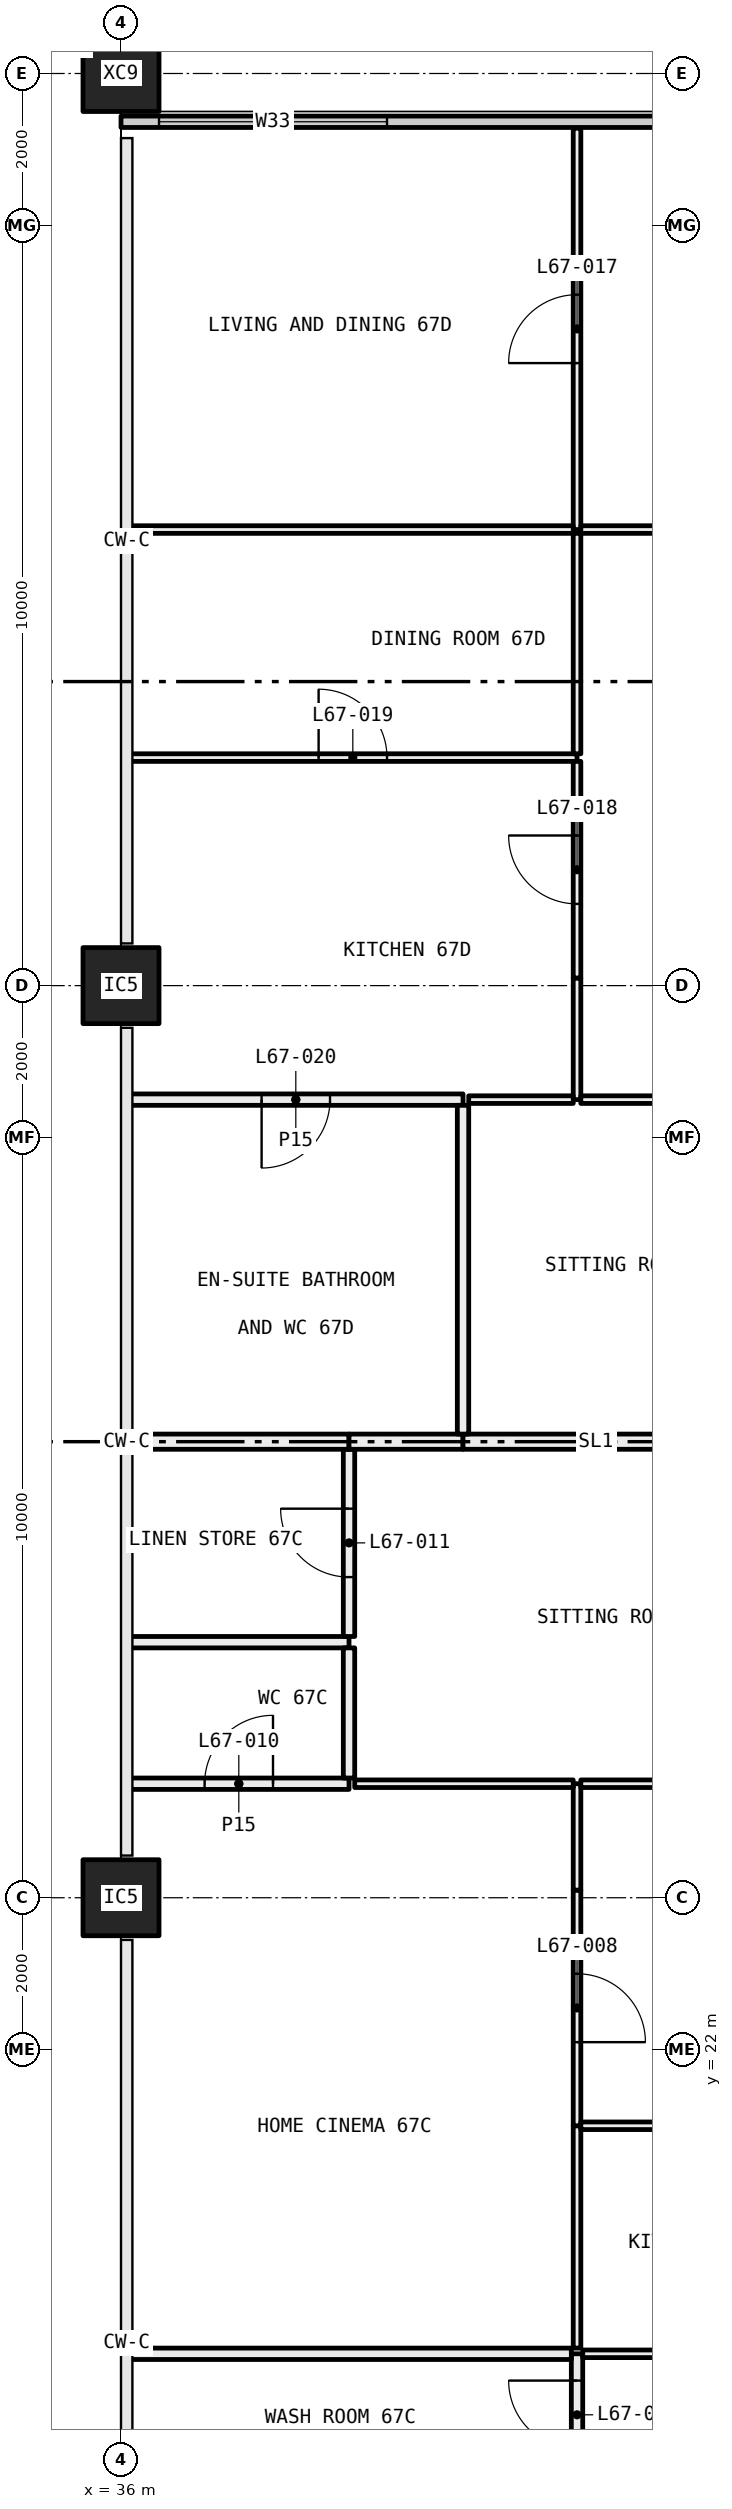
"""IFC4 building model, lengths in metres.
Left out: names, types, materials, properties, quantities, classifications, styles, units other than length and angle.
Written with IfcOpenShell. Run it as: python <this file> out.ifc"""

import sys

from ifc_helpers import new_model, si_unit, direction, frame, frame_2d, origin, origin_2d, place, context, subcontext, project, spatial, rectangle, hollow_rectangle, extrude, element, fill, save


model = new_model("IFC4")
c1 = context("Model", 3, precision=1e-05, world=origin(), true_north=direction((0.0, 1.0)))
c2 = subcontext(c1, "Body", "Model", "MODEL_VIEW")
j1 = project(units=[si_unit("LENGTHUNIT", "METRE"), si_unit("PLANEANGLEUNIT", "RADIAN")], contexts=[c1])
p1 = place(None, origin())
s1 = spatial("IfcSite", under=j1, at=p1, CompositionType="ELEMENT")
p2 = place(p1, origin())
s2 = spatial("IfcBuilding", under=s1, at=p2, CompositionType="ELEMENT")
p3 = place(p2, frame((0.0, 0.0, 249.0)))
s3 = spatial("IfcBuildingStorey", under=s2, at=p3, CompositionType="ELEMENT", Elevation=249.0)
for number, where, z_axis, x_axis in (
    (1, (36.0, 24.0, 0.0), (0.0, 0.0, 1.0), (1.0, 0.0, 0.0)),
    (2, (36.0, 36.0, 0.0), (0.0, 0.0, 1.0), (1.0, 0.0, 0.0)),
):
    element("IfcColumn", number, at=place(p3, frame(where, z_axis=z_axis, x_axis=x_axis)), inside=s3, PredefinedType="COLUMN", context=c2, shape_type="SweptSolid", body=[
        extrude(hollow_rectangle(XDim=1.0, YDim=1.0, WallThickness=0.04, at=origin_2d()), origin(), (0.0, 0.0, 1.0), 3.05),
    ])
p4 = place(p3, frame((36.0, 48.0, -0.4), z_axis=(0.0, 0.0, 1.0), x_axis=(1.0, 0.0, 0.0)))
e3 = element("IfcColumn", 3, at=p4, inside=s3, PredefinedType="COLUMN", context=c2, shape_type="SweptSolid", body=[
    extrude(hollow_rectangle(XDim=1.0, YDim=1.0, WallThickness=0.036, at=origin_2d()), origin(), (0.0, 0.0, 1.0), 3.45),
])
p5 = place(p3, frame((36.0, 47.365, 0.0), z_axis=(0.0, 0.0, 1.0), x_axis=(1.0, 0.0, 0.0)))
e4 = element("IfcWall", 4, at=p5, inside=s3, PredefinedType="ELEMENTEDWALL", context=c2, shape_type="SweptSolid", body=[
    extrude(rectangle(XDim=17.44, YDim=0.15, at=frame_2d((8.72, 0.0))), origin(), (0.0, 0.0, 1.0), 3.05),
])
p6 = place(p5, frame((0.5, 0.0, 0.45)))
e5 = element("IfcOpeningElement", 5, at=p6, cuts=e4, PredefinedType="OPENING", context=c2, shape_type="SweptSolid", body=[
    extrude(rectangle(XDim=3.0, YDim=2.55, at=frame_2d((1.5, 1.275))), frame((0.0, 0.085, 0.0), z_axis=(0.0, -1.0, 0.0), x_axis=(1.0, 0.0, 0.0)), (0.0, 0.0, 1.0), 0.17),
])
p7 = place(p5, frame((8.5, 0.0, 0.45)))
e6 = element("IfcOpeningElement", 6, at=p7, cuts=e4, PredefinedType="OPENING", context=c2, shape_type="SweptSolid", body=[
    extrude(rectangle(XDim=3.0, YDim=2.55, at=frame_2d((1.5, 1.275))), frame((0.0, 0.085, 0.0), z_axis=(0.0, -1.0, 0.0), x_axis=(1.0, 0.0, 0.0)), (0.0, 0.0, 1.0), 0.17),
])
p8 = place(p5, frame((12.5, 0.0, 0.45)))
e7 = element("IfcOpeningElement", 7, at=p8, cuts=e4, PredefinedType="OPENING", context=c2, shape_type="SweptSolid", body=[
    extrude(rectangle(XDim=4.5, YDim=2.55, at=frame_2d((2.25, 1.275))), frame((0.0, 0.085, 0.0), z_axis=(0.0, -1.0, 0.0), x_axis=(1.0, 0.0, 0.0)), (0.0, 0.0, 1.0), 0.17),
])
p9 = place(p3, frame((42.0, 16.395, 0.0), z_axis=(0.0, 0.0, 1.0), x_axis=(0.0, 1.0, 0.0)))
e8 = element("IfcWall", 8, at=p9, inside=s3, PredefinedType="PARTITIONING", context=c2, shape_type="SweptSolid", body=[
    extrude(rectangle(XDim=1.605, YDim=0.15, at=frame_2d((0.802, 0.0))), origin(), (0.0, 0.0, 1.0), 3.05),
])
p10 = place(p9, frame((0.353, 0.0, 0.0)))
e9 = element("IfcOpeningElement", 9, at=p10, cuts=e8, PredefinedType="OPENING", context=c2, shape_type="SweptSolid", body=[
    extrude(rectangle(XDim=0.9, YDim=2.1, at=frame_2d((0.45, 1.05))), frame((0.0, 0.085, 0.0), z_axis=(0.0, -1.0, 0.0), x_axis=(1.0, 0.0, 0.0)), (0.0, 0.0, 1.0), 0.17),
])
p11 = place(p3, frame((41.925, 18.0, 0.0), z_axis=(0.0, 0.0, 1.0), x_axis=(-1.0, 0.0, 0.0)))
e10 = element("IfcWall", 10, at=p11, inside=s3, PredefinedType="PARTITIONING", context=c2, shape_type="SweptSolid", body=[
    extrude(rectangle(XDim=5.825, YDim=0.15, at=frame_2d((2.913, 0.0))), origin(), (0.0, 0.0, 1.0), 3.05),
])
p12 = place(p3, frame((47.95, 18.0, 0.0), z_axis=(0.0, 0.0, 1.0), x_axis=(-1.0, 0.0, 0.0)))
e11 = element("IfcWall", 11, at=p12, inside=s3, PredefinedType="PARTITIONING", context=c2, shape_type="SweptSolid", body=[
    extrude(rectangle(XDim=5.875, YDim=0.1, at=frame_2d((2.938, 0.0))), origin(), (0.0, 0.0, 1.0), 3.05),
])
p13 = place(p12, frame((2.488, 0.0, 0.0)))
e12 = element("IfcOpeningElement", 12, at=p13, cuts=e11, PredefinedType="OPENING", context=c2, shape_type="SweptSolid", body=[
    extrude(rectangle(XDim=0.9, YDim=2.1, at=frame_2d((0.45, 1.05))), frame((0.0, 0.06, 0.0), z_axis=(0.0, -1.0, 0.0), x_axis=(1.0, 0.0, 0.0)), (0.0, 0.0, 1.0), 0.12),
])
p14 = place(p3, frame((42.0, 18.075, 0.0), z_axis=(0.0, 0.0, 1.0), x_axis=(0.0, 1.0, 0.0)))
e13 = element("IfcWall", 13, at=p14, inside=s3, PredefinedType="PARTITIONING", context=c2, shape_type="SweptSolid", body=[
    extrude(rectangle(XDim=2.925, YDim=0.1, at=frame_2d((1.462, 0.0))), origin(), (0.0, 0.0, 1.0), 3.05),
])
p15 = place(p3, frame((42.0, 21.0, 0.0), z_axis=(0.0, 0.0, 1.0), x_axis=(0.0, 1.0, 0.0)))
e14 = element("IfcWall", 14, at=p15, inside=s3, PredefinedType="PARTITIONING", context=c2, shape_type="SweptSolid", body=[
    extrude(rectangle(XDim=3.1, YDim=0.1, at=frame_2d((1.55, 0.0))), origin(), (0.0, 0.0, 1.0), 2.45),
])
p16 = place(p15, frame((1.1, 0.0, 0.0)))
e15 = element("IfcOpeningElement", 15, at=p16, cuts=e14, PredefinedType="OPENING", context=c2, shape_type="SweptSolid", body=[
    extrude(rectangle(XDim=0.9, YDim=2.1, at=frame_2d((0.45, 1.05))), frame((0.0, 0.06, 0.0), z_axis=(0.0, -1.0, 0.0), x_axis=(1.0, 0.0, 0.0)), (0.0, 0.0, 1.0), 0.12),
])
p17 = place(p3, frame((42.0, 24.1, 0.0), z_axis=(0.0, 0.0, 1.0), x_axis=(0.0, 1.0, 0.0)))
e16 = element("IfcWall", 16, at=p17, inside=s3, PredefinedType="PARTITIONING", context=c2, shape_type="SweptSolid", body=[
    extrude(rectangle(XDim=1.4, YDim=0.1, at=frame_2d((0.7, 0.0))), origin(), (0.0, 0.0, 1.0), 3.05),
])
p18 = place(p3, frame((39.0, 25.5, 0.0), z_axis=(0.0, 0.0, 1.0), x_axis=(-1.0, 0.0, 0.0)))
e17 = element("IfcWall", 17, at=p18, inside=s3, PredefinedType="PARTITIONING", context=c2, shape_type="SweptSolid", body=[
    extrude(rectangle(XDim=2.9, YDim=0.15, at=frame_2d((1.45, 0.0))), origin(), (0.0, 0.0, 1.0), 3.05),
])
p19 = place(p18, frame((1.0, 0.0, 0.0)))
e18 = element("IfcOpeningElement", 18, at=p19, cuts=e17, PredefinedType="OPENING", context=c2, shape_type="SweptSolid", body=[
    extrude(rectangle(XDim=0.9, YDim=2.1, at=frame_2d((0.45, 1.05))), frame((0.0, 0.085, 0.0), z_axis=(0.0, -1.0, 0.0), x_axis=(1.0, 0.0, 0.0)), (0.0, 0.0, 1.0), 0.17),
])
p20 = place(p3, frame((41.95, 25.5, 0.0), z_axis=(0.0, 0.0, 1.0), x_axis=(-1.0, 0.0, 0.0)))
e19 = element("IfcWall", 19, at=p20, inside=s3, PredefinedType="PARTITIONING", context=c2, shape_type="SweptSolid", body=[
    extrude(rectangle(XDim=2.875, YDim=0.1, at=frame_2d((1.438, 0.0))), origin(), (0.0, 0.0, 1.0), 3.05),
])
p21 = place(p3, frame((48.45, 21.0, 0.0), z_axis=(0.0, 0.0, 1.0), x_axis=(-1.0, 0.0, 0.0)))
e20 = element("IfcWall", 20, at=p21, inside=s3, PredefinedType="PARTITIONING", context=c2, shape_type="SweptSolid", body=[
    extrude(rectangle(XDim=6.4, YDim=0.1, at=frame_2d((3.2, 0.0))), origin(), (0.0, 0.0, 1.0), 3.05),
])
p22 = place(p21, frame((2.75, 0.0, 0.0)))
e21 = element("IfcOpeningElement", 21, at=p22, cuts=e20, PredefinedType="OPENING", context=c2, shape_type="SweptSolid", body=[
    extrude(rectangle(XDim=0.9, YDim=2.1, at=frame_2d((0.45, 1.05))), frame((0.0, 0.06, 0.0), z_axis=(0.0, -1.0, 0.0), x_axis=(1.0, 0.0, 0.0)), (0.0, 0.0, 1.0), 0.12),
])
p23 = place(p3, frame((48.5, 25.5, 0.0), z_axis=(0.0, 0.0, 1.0), x_axis=(-1.0, 0.0, 0.0)))
e22 = element("IfcWall", 22, at=p23, inside=s3, PredefinedType="PARTITIONING", context=c2, shape_type="SweptSolid", body=[
    extrude(rectangle(XDim=6.45, YDim=0.1, at=frame_2d((3.225, 0.0))), origin(), (0.0, 0.0, 1.0), 3.05),
])
p24 = place(p23, frame((2.775, 0.0, 0.0)))
e23 = element("IfcOpeningElement", 23, at=p24, cuts=e22, PredefinedType="OPENING", context=c2, shape_type="SweptSolid", body=[
    extrude(rectangle(XDim=0.9, YDim=2.1, at=frame_2d((0.45, 1.05))), frame((0.0, 0.06, 0.0), z_axis=(0.0, -1.0, 0.0), x_axis=(1.0, 0.0, 0.0)), (0.0, 0.0, 1.0), 0.12),
])
p25 = place(p3, frame((39.0, 27.362, 0.0), z_axis=(0.0, 0.0, 1.0), x_axis=(-1.0, 0.0, 0.0)))
e24 = element("IfcWall", 24, at=p25, inside=s3, PredefinedType="PARTITIONING", context=c2, shape_type="SweptSolid", body=[
    extrude(rectangle(XDim=2.9, YDim=0.15, at=frame_2d((1.45, 0.0))), origin(), (0.0, 0.0, 1.0), 3.05),
])
p26 = place(p3, frame((39.0, 25.575, 0.0), z_axis=(0.0, 0.0, 1.0), x_axis=(0.0, 1.0, 0.0)))
e25 = element("IfcWall", 25, at=p26, inside=s3, PredefinedType="PARTITIONING", context=c2, shape_type="SweptSolid", body=[
    extrude(rectangle(XDim=1.712, YDim=0.15, at=frame_2d((0.856, 0.0))), origin(), (0.0, 0.0, 1.0), 3.05),
])
p27 = place(p3, frame((39.0, 27.437, 0.0), z_axis=(0.0, 0.0, 1.0), x_axis=(0.0, 1.0, 0.0)))
e26 = element("IfcWall", 26, at=p27, inside=s3, PredefinedType="PARTITIONING", context=c2, shape_type="SweptSolid", body=[
    extrude(rectangle(XDim=2.463, YDim=0.15, at=frame_2d((1.231, 0.0))), origin(), (0.0, 0.0, 1.0), 3.05),
])
p28 = place(p27, frame((0.781, 0.0, 0.0)))
e27 = element("IfcOpeningElement", 27, at=p28, cuts=e26, PredefinedType="OPENING", context=c2, shape_type="SweptSolid", body=[
    extrude(rectangle(XDim=0.9, YDim=2.1, at=frame_2d((0.45, 1.05))), frame((0.0, 0.085, 0.0), z_axis=(0.0, -1.0, 0.0), x_axis=(1.0, 0.0, 0.0)), (0.0, 0.0, 1.0), 0.17),
])
p29 = place(p3, frame((39.0, 30.0, 0.0), z_axis=(0.0, 0.0, 1.0), x_axis=(-1.0, 0.0, 0.0)))
e28 = element("IfcWall", 28, at=p29, inside=s3, PredefinedType="PARTITIONING", context=c2, shape_type="SweptSolid", body=[
    extrude(rectangle(XDim=2.9, YDim=0.2, at=frame_2d((1.45, 0.0))), origin(), (0.0, 0.0, 1.0), 3.05),
])
p30 = place(p3, frame((40.5, 30.0, 0.0), z_axis=(0.0, 0.0, 1.0), x_axis=(-1.0, 0.0, 0.0)))
e29 = element("IfcWall", 29, at=p30, inside=s3, PredefinedType="PARTITIONING", context=c2, shape_type="SweptSolid", body=[
    extrude(rectangle(XDim=1.5, YDim=0.2, at=frame_2d((0.75, 0.0))), origin(), (0.0, 0.0, 1.0), 3.05),
])
p31 = place(p3, frame((46.1, 30.0, 0.0), z_axis=(0.0, 0.0, 1.0), x_axis=(-1.0, 0.0, 0.0)))
e30 = element("IfcWall", 30, at=p31, inside=s3, PredefinedType="PARTITIONING", context=c2, shape_type="SweptSolid", body=[
    extrude(rectangle(XDim=5.6, YDim=0.2, at=frame_2d((2.8, 0.0))), origin(), (0.0, 0.0, 1.0), 3.05),
])
p32 = place(p3, frame((42.0, 42.0, 0.0), z_axis=(0.0, 0.0, 1.0), x_axis=(0.0, 1.0, 0.0)))
e31 = element("IfcWall", 31, at=p32, inside=s3, PredefinedType="PARTITIONING", context=c2, shape_type="SweptSolid", body=[
    extrude(rectangle(XDim=5.28, YDim=0.1, at=frame_2d((2.64, 0.0))), origin(), (0.0, 0.0, 1.0), 3.05),
])
p33 = place(p32, frame((2.19, 0.0, 0.0)))
e32 = element("IfcOpeningElement", 32, at=p33, cuts=e31, PredefinedType="OPENING", context=c2, shape_type="SweptSolid", body=[
    extrude(rectangle(XDim=0.9, YDim=2.1, at=frame_2d((0.45, 1.05))), frame((0.0, 0.06, 0.0), z_axis=(0.0, -1.0, 0.0), x_axis=(1.0, 0.0, 0.0)), (0.0, 0.0, 1.0), 0.12),
])
p34 = place(p3, frame((36.1, 42.0, 0.0), z_axis=(0.0, 0.0, 1.0), x_axis=(1.0, 0.0, 0.0)))
e33 = element("IfcWall", 33, at=p34, inside=s3, PredefinedType="PARTITIONING", context=c2, shape_type="SweptSolid", body=[
    extrude(rectangle(XDim=5.85, YDim=0.1, at=frame_2d((2.925, 0.0))), origin(), (0.0, 0.0, 1.0), 3.05),
])
p35 = place(p3, frame((42.05, 42.0, 0.0), z_axis=(0.0, 0.0, 1.0), x_axis=(1.0, 0.0, 0.0)))
e34 = element("IfcWall", 34, at=p35, inside=s3, PredefinedType="PARTITIONING", context=c2, shape_type="SweptSolid", body=[
    extrude(rectangle(XDim=3.95, YDim=0.1, at=frame_2d((1.975, 0.0))), origin(), (0.0, 0.0, 1.0), 3.05),
])
p36 = place(p35, frame((1.525, 0.0, 0.0)))
e35 = element("IfcOpeningElement", 35, at=p36, cuts=e34, PredefinedType="OPENING", context=c2, shape_type="SweptSolid", body=[
    extrude(rectangle(XDim=0.9, YDim=2.1, at=frame_2d((0.45, 1.05))), frame((0.0, 0.06, 0.0), z_axis=(0.0, -1.0, 0.0), x_axis=(1.0, 0.0, 0.0)), (0.0, 0.0, 1.0), 0.12),
])
p37 = place(p3, frame((42.0, 39.0, 0.0), z_axis=(0.0, 0.0, 1.0), x_axis=(-1.0, 0.0, 0.0)))
e36 = element("IfcWall", 36, at=p37, inside=s3, PredefinedType="PARTITIONING", context=c2, shape_type="SweptSolid", body=[
    extrude(rectangle(XDim=5.9, YDim=0.1, at=frame_2d((2.95, 0.0))), origin(), (0.0, 0.0, 1.0), 3.05),
])
p38 = place(p37, frame((2.5, 0.0, 0.0)))
e37 = element("IfcOpeningElement", 37, at=p38, cuts=e36, PredefinedType="OPENING", context=c2, shape_type="SweptSolid", body=[
    extrude(rectangle(XDim=0.9, YDim=2.1, at=frame_2d((0.45, 1.05))), frame((0.0, 0.06, 0.0), z_axis=(0.0, -1.0, 0.0), x_axis=(1.0, 0.0, 0.0)), (0.0, 0.0, 1.0), 0.12),
])
p39 = place(p3, frame((42.0, 34.5, 0.0), z_axis=(0.0, 0.0, 1.0), x_axis=(0.0, 1.0, 0.0)))
e38 = element("IfcWall", 38, at=p39, inside=s3, PredefinedType="PARTITIONING", context=c2, shape_type="SweptSolid", body=[
    extrude(rectangle(XDim=1.6, YDim=0.1, at=frame_2d((0.8, 0.0))), origin(), (0.0, 0.0, 1.0), 2.45),
])
p40 = place(p3, frame((42.0, 36.1, 0.0), z_axis=(0.0, 0.0, 1.0), x_axis=(0.0, 1.0, 0.0)))
e39 = element("IfcWall", 39, at=p40, inside=s3, PredefinedType="PARTITIONING", context=c2, shape_type="SweptSolid", body=[
    extrude(rectangle(XDim=2.85, YDim=0.1, at=frame_2d((1.425, 0.0))), origin(), (0.0, 0.0, 1.0), 3.05),
])
p41 = place(p40, frame((0.975, 0.0, 0.0)))
e40 = element("IfcOpeningElement", 40, at=p41, cuts=e39, PredefinedType="OPENING", context=c2, shape_type="SweptSolid", body=[
    extrude(rectangle(XDim=0.9, YDim=2.1, at=frame_2d((0.45, 1.05))), frame((0.0, 0.06, 0.0), z_axis=(0.0, -1.0, 0.0), x_axis=(1.0, 0.0, 0.0)), (0.0, 0.0, 1.0), 0.12),
])
p42 = place(p3, frame((36.1, 34.5, 0.0), z_axis=(0.0, 0.0, 1.0), x_axis=(1.0, 0.0, 0.0)))
e41 = element("IfcWall", 41, at=p42, inside=s3, PredefinedType="PARTITIONING", context=c2, shape_type="SweptSolid", body=[
    extrude(rectangle(XDim=4.4, YDim=0.15, at=frame_2d((2.2, 0.0))), origin(), (0.0, 0.0, 1.0), 3.05),
])
p43 = place(p42, frame((1.75, 0.0, 0.0)))
e42 = element("IfcOpeningElement", 42, at=p43, cuts=e41, PredefinedType="OPENING", context=c2, shape_type="SweptSolid", body=[
    extrude(rectangle(XDim=0.9, YDim=2.1, at=frame_2d((0.45, 1.05))), frame((0.0, 0.085, 0.0), z_axis=(0.0, -1.0, 0.0), x_axis=(1.0, 0.0, 0.0)), (0.0, 0.0, 1.0), 0.17),
])
p44 = place(p3, frame((40.575, 34.5, 0.0), z_axis=(0.0, 0.0, 1.0), x_axis=(1.0, 0.0, 0.0)))
e43 = element("IfcWall", 43, at=p44, inside=s3, PredefinedType="PARTITIONING", context=c2, shape_type="SweptSolid", body=[
    extrude(rectangle(XDim=1.375, YDim=0.1, at=frame_2d((0.688, 0.0))), origin(), (0.0, 0.0, 1.0), 3.05),
])
p45 = place(p3, frame((42.0, 39.05, 0.0), z_axis=(0.0, 0.0, 1.0), x_axis=(0.0, 1.0, 0.0)))
e44 = element("IfcWall", 44, at=p45, inside=s3, PredefinedType="PARTITIONING", context=c2, shape_type="SweptSolid", body=[
    extrude(rectangle(XDim=2.9, YDim=0.1, at=frame_2d((1.45, 0.0))), origin(), (0.0, 0.0, 1.0), 3.05),
])
p46 = place(p3, frame((42.05, 34.5, 0.0), z_axis=(0.0, 0.0, 1.0), x_axis=(1.0, 0.0, 0.0)))
e45 = element("IfcWall", 45, at=p46, inside=s3, PredefinedType="PARTITIONING", context=c2, shape_type="SweptSolid", body=[
    extrude(rectangle(XDim=6.45, YDim=0.1, at=frame_2d((3.225, 0.0))), origin(), (0.0, 0.0, 1.0), 3.05),
])
p47 = place(p46, frame((2.775, 0.0, 0.0)))
e46 = element("IfcOpeningElement", 46, at=p47, cuts=e45, PredefinedType="OPENING", context=c2, shape_type="SweptSolid", body=[
    extrude(rectangle(XDim=0.9, YDim=2.1, at=frame_2d((0.45, 1.05))), frame((0.0, 0.06, 0.0), z_axis=(0.0, -1.0, 0.0), x_axis=(1.0, 0.0, 0.0)), (0.0, 0.0, 1.0), 0.12),
])
p48 = place(p3, frame((40.5, 30.1, 0.0), z_axis=(0.0, 0.0, 1.0), x_axis=(0.0, 1.0, 0.0)))
e47 = element("IfcWall", 47, at=p48, inside=s3, PredefinedType="PARTITIONING", context=c2, shape_type="SweptSolid", body=[
    extrude(rectangle(XDim=4.325, YDim=0.15, at=frame_2d((2.163, 0.0))), origin(), (0.0, 0.0, 1.0), 3.05),
])
p49 = place(p6, origin())
e48 = element("IfcWindow", 48, at=p49, inside=s3, PartitioningType="SINGLE_PANEL", PredefinedType="WINDOW", context=c2, shape_type="SweptSolid", body=[
    extrude(rectangle(XDim=3.0, YDim=2.55, at=frame_2d((1.5, 1.275))), frame((0.0, 0.03, 0.0), z_axis=(0.0, -1.0, 0.0), x_axis=(1.0, 0.0, 0.0)), (0.0, 0.0, 1.0), 0.06),
])
fill(e5, e48)
p50 = place(p10, origin())
e49 = element("IfcDoor", 49, at=p50, inside=s3, OperationType="SINGLE_SWING_LEFT", PredefinedType="DOOR", context=c2, shape_type="SweptSolid", body=[
    extrude(rectangle(XDim=0.9, YDim=2.1, at=frame_2d((0.45, 1.05))), frame((0.0, 0.025, 0.0), z_axis=(0.0, -1.0, 0.0), x_axis=(1.0, 0.0, 0.0)), (0.0, 0.0, 1.0), 0.05),
])
fill(e9, e49)
p51 = place(p16, frame((0.9, 0.0, 0.0), x_axis=(-1.0, 0.0, 0.0)))
e50 = element("IfcDoor", 50, at=p51, inside=s3, OperationType="SINGLE_SWING_LEFT", PredefinedType="DOOR", context=c2, shape_type="SweptSolid", body=[
    extrude(rectangle(XDim=0.9, YDim=2.1, at=frame_2d((0.45, 1.05))), frame((0.0, 0.025, 0.0), z_axis=(0.0, -1.0, 0.0), x_axis=(1.0, 0.0, 0.0)), (0.0, 0.0, 1.0), 0.05),
])
fill(e15, e50)
p52 = place(p19, frame((0.9, 0.0, 0.0), x_axis=(-1.0, 0.0, 0.0)))
e51 = element("IfcDoor", 51, at=p52, inside=s3, OperationType="SINGLE_SWING_LEFT", PredefinedType="DOOR", context=c2, shape_type="SweptSolid", body=[
    extrude(rectangle(XDim=0.9, YDim=2.1, at=frame_2d((0.45, 1.05))), frame((0.0, 0.025, 0.0), z_axis=(0.0, -1.0, 0.0), x_axis=(1.0, 0.0, 0.0)), (0.0, 0.0, 1.0), 0.05),
])
fill(e18, e51)
p53 = place(p28, origin())
e52 = element("IfcDoor", 52, at=p53, inside=s3, OperationType="SINGLE_SWING_LEFT", PredefinedType="DOOR", context=c2, shape_type="SweptSolid", body=[
    extrude(rectangle(XDim=0.9, YDim=2.1, at=frame_2d((0.45, 1.05))), frame((0.0, 0.025, 0.0), z_axis=(0.0, -1.0, 0.0), x_axis=(1.0, 0.0, 0.0)), (0.0, 0.0, 1.0), 0.05),
])
fill(e27, e52)
p54 = place(p33, origin())
e53 = element("IfcDoor", 53, at=p54, inside=s3, OperationType="SINGLE_SWING_RIGHT", PredefinedType="DOOR", context=c2, shape_type="SweptSolid", body=[
    extrude(rectangle(XDim=0.9, YDim=2.1, at=frame_2d((0.45, 1.05))), frame((0.0, 0.025, 0.0), z_axis=(0.0, -1.0, 0.0), x_axis=(1.0, 0.0, 0.0)), (0.0, 0.0, 1.0), 0.05),
])
fill(e32, e53)
p55 = place(p41, origin())
e54 = element("IfcDoor", 54, at=p55, inside=s3, OperationType="SINGLE_SWING_LEFT", PredefinedType="DOOR", context=c2, shape_type="SweptSolid", body=[
    extrude(rectangle(XDim=0.9, YDim=2.1, at=frame_2d((0.45, 1.05))), frame((0.0, 0.025, 0.0), z_axis=(0.0, -1.0, 0.0), x_axis=(1.0, 0.0, 0.0)), (0.0, 0.0, 1.0), 0.05),
])
fill(e40, e54)
p56 = place(p38, frame((0.9, 0.0, 0.0), x_axis=(-1.0, 0.0, 0.0)))
e55 = element("IfcDoor", 55, at=p56, inside=s3, OperationType="SINGLE_SWING_RIGHT", PredefinedType="DOOR", context=c2, shape_type="SweptSolid", body=[
    extrude(rectangle(XDim=0.9, YDim=2.1, at=frame_2d((0.45, 1.05))), frame((0.0, 0.025, 0.0), z_axis=(0.0, -1.0, 0.0), x_axis=(1.0, 0.0, 0.0)), (0.0, 0.0, 1.0), 0.05),
])
fill(e37, e55)
p57 = place(p43, frame((0.9, 0.0, 0.0), x_axis=(-1.0, 0.0, 0.0)))
e56 = element("IfcDoor", 56, at=p57, inside=s3, OperationType="SINGLE_SWING_LEFT", PredefinedType="DOOR", context=c2, shape_type="SweptSolid", body=[
    extrude(rectangle(XDim=0.9, YDim=2.1, at=frame_2d((0.45, 1.05))), frame((0.0, 0.025, 0.0), z_axis=(0.0, -1.0, 0.0), x_axis=(1.0, 0.0, 0.0)), (0.0, 0.0, 1.0), 0.05),
])
fill(e42, e56)
save(model, sys.argv[1])
